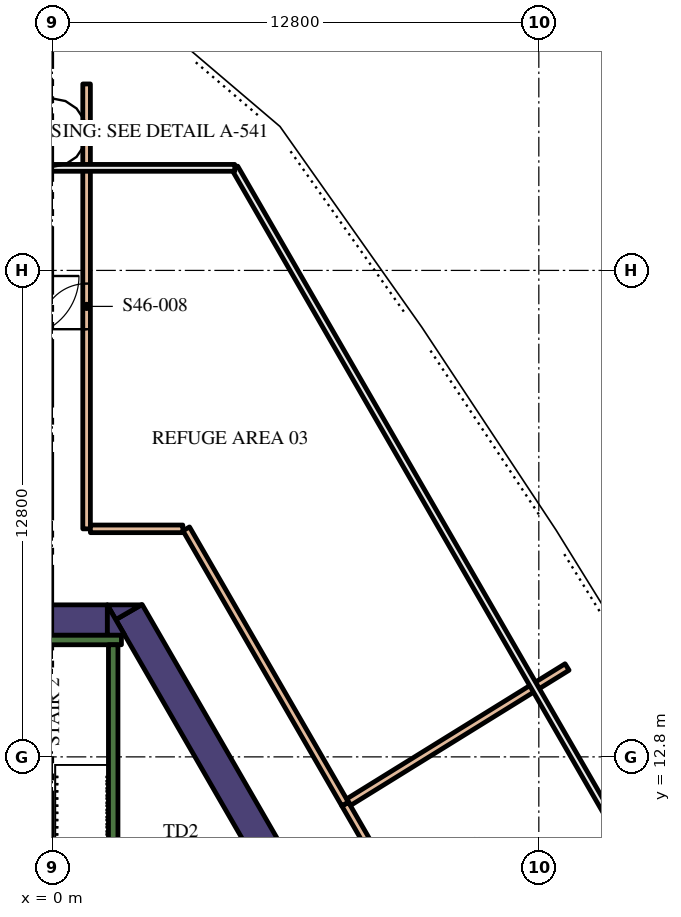
"""IFC4 building model, lengths in metres.
Left out: names, types, materials, properties, quantities, classifications, styles, units other than length and angle.
Written with IfcOpenShell. Run it as: python <this file> out.ifc"""

import sys

from ifc_helpers import new_model, si_unit, direction, frame, frame_2d, origin, place, context, subcontext, project, spatial, polyline, rectangle, outline, extrude, element, fill, save


model = new_model("IFC4")
c1 = context("Model", 3, precision=1e-05, world=origin(), true_north=direction((0.0, 1.0)))
c2 = subcontext(c1, "Body", "Model", "MODEL_VIEW")
j1 = project(units=[si_unit("LENGTHUNIT", "METRE"), si_unit("PLANEANGLEUNIT", "RADIAN")], contexts=[c1])
p1 = place(None, origin())
s1 = spatial("IfcSite", under=j1, at=p1, CompositionType="ELEMENT")
p2 = place(p1, origin())
s2 = spatial("IfcBuilding", under=s1, at=p2, CompositionType="ELEMENT")
p3 = place(p2, frame((0.0, 0.0, 196.2)))
s3 = spatial("IfcBuildingStorey", under=s2, at=p3, CompositionType="ELEMENT", Elevation=196.2)
p4 = place(p3, frame((8.279, 5.761, 0.0), z_axis=(0.0, 0.0, 1.0), x_axis=(-0.500010359015, 0.866019422922, 0.0)))
e1 = element("IfcWall", 1, at=p4, inside=s3, PredefinedType="SOLIDWALL", context=c2, shape_type="SweptSolid", body=[
    extrude(rectangle(XDim=12.528, YDim=0.8, at=frame_2d((6.264, 0.0))), origin(), (0.0, 0.0, 1.0), 5.4),
])
p5 = place(p3, origin())
e2 = element("IfcWall", 2, at=p5, inside=s3, PredefinedType="SOLIDWALL", context=c2, shape_type="SweptSolid", body=[
    extrude(outline(polyline([(1.443, 16.8), (2.339, 16.8), (1.667, 16.412), (1.443, 16.8)])), origin(), (0.0, 0.0, 1.0), 5.4),
])
p6 = place(p3, frame((-2.379, 16.4, 0.0), z_axis=(0.0, 0.0, 1.0), x_axis=(1.0, 0.0, 0.0)))
e3 = element("IfcWall", 3, at=p6, inside=s3, PredefinedType="SOLIDWALL", context=c2, shape_type="SweptSolid", body=[
    extrude(rectangle(XDim=3.824, YDim=0.8, at=frame_2d((1.912, 0.0))), origin(), (0.0, 0.0, 1.0), 5.4),
])
e4 = element("IfcWall", 4, at=p5, inside=s3, PredefinedType="SOLIDWALL", context=c2, shape_type="SweptSolid", body=[
    extrude(outline(polyline([(1.905, 16.0), (1.447, 16.0), (1.447, 16.793), (1.905, 16.0)])), origin(), (0.0, 0.0, 1.0), 5.4),
])
p7 = place(p3, frame((-1.817, 15.875, 0.0), z_axis=(0.0, 0.0, 1.0), x_axis=(1.0, 0.0, 0.0)))
e5 = element("IfcWall", 5, at=p7, inside=s3, PredefinedType="SOLIDWALL", context=c2, shape_type="SweptSolid", body=[
    extrude(rectangle(XDim=3.634, YDim=0.25, at=frame_2d((1.817, 0.0))), origin(), (0.0, 0.0, 1.0), 5.4),
])
p8 = place(p3, frame((1.6, 8.95, 0.0), z_axis=(0.0, 0.0, 1.0), x_axis=(0.0, 1.0, 0.0)))
e6 = element("IfcWall", 6, at=p8, inside=s3, PredefinedType="SOLIDWALL", context=c2, shape_type="SweptSolid", body=[
    extrude(rectangle(XDim=6.8, YDim=0.25, at=frame_2d((3.4, 0.0))), origin(), (0.0, 0.0, 1.0), 5.4),
])
p9 = place(p3, frame((13.858, 0.897, 0.0), z_axis=(0.0, 0.0, 1.0), x_axis=(-0.500005845305, 0.86602202897, 0.0)))
e7 = element("IfcWall", 7, at=p9, inside=s3, PredefinedType="PARTITIONING", context=c2, shape_type="SweptSolid", body=[
    extrude(rectangle(XDim=12.304, YDim=0.2, at=frame_2d((6.152, 0.0))), origin(), (0.0, 0.0, 1.0), 4.65),
])
p10 = place(p9, frame((5.352, 0.0, 0.0)))
e8 = element("IfcOpeningElement", 8, at=p10, cuts=e7, PredefinedType="OPENING", context=c2, shape_type="SweptSolid", body=[
    extrude(rectangle(XDim=1.6, YDim=2.1, at=frame_2d((0.8, 1.05))), frame((0.0, 0.11, 0.0), z_axis=(0.0, -1.0, 0.0), x_axis=(1.0, 0.0, 0.0)), (0.0, 0.0, 1.0), 0.22),
])
p11 = place(p3, frame((0.9, 18.8, 0.0), z_axis=(0.0, 0.0, 1.0), x_axis=(0.0, 1.0, 0.0)))
e9 = element("IfcWall", 9, at=p11, inside=s3, PredefinedType="PARTITIONING", context=c2, shape_type="SweptSolid", body=[
    extrude(rectangle(XDim=11.706, YDim=0.2, at=frame_2d((5.853, 0.0))), origin(), (0.0, 0.0, 1.0), 4.65),
])
p12 = place(p11, frame((5.253, 0.0, 0.0)))
e10 = element("IfcOpeningElement", 10, at=p12, cuts=e9, PredefinedType="OPENING", context=c2, shape_type="SweptSolid", body=[
    extrude(rectangle(XDim=1.2, YDim=2.1, at=frame_2d((0.6, 1.05))), frame((0.0, 0.11, 0.0), z_axis=(0.0, -1.0, 0.0), x_axis=(1.0, 0.0, 0.0)), (0.0, 0.0, 1.0), 0.22),
])
p13 = place(p3, frame((3.522, 18.8, 0.0), z_axis=(0.0, 0.0, 1.0), x_axis=(0.500012366307, -0.866018263976, 0.0)))
e11 = element("IfcWall", 11, at=p13, inside=s3, PredefinedType="PARTITIONING", context=c2, shape_type="SweptSolid", body=[
    extrude(rectangle(XDim=8.359, YDim=0.2, at=frame_2d((4.179, 0.0))), origin(), (0.0, 0.0, 1.0), 4.65),
])
p14 = place(p3, frame((7.8, 11.611, 0.0), z_axis=(0.0, 0.0, 1.0), x_axis=(0.850373744728, 0.526179146562, 0.0)))
e12 = element("IfcWall", 12, at=p14, inside=s3, PredefinedType="PARTITIONING", context=c2, shape_type="SweptSolid", body=[
    extrude(rectangle(XDim=6.754, YDim=0.2, at=frame_2d((3.377, 0.0))), origin(), (0.0, 0.0, 1.0), 4.65),
])
p15 = place(p3, frame((1.0, 18.8, 0.0), z_axis=(0.0, 0.0, 1.0), x_axis=(1.0, 0.0, 0.0)))
e13 = element("IfcWall", 13, at=p15, inside=s3, PredefinedType="PARTITIONING", context=c2, shape_type="SweptSolid", body=[
    extrude(rectangle(XDim=2.432, YDim=0.2, at=frame_2d((1.216, 0.0))), origin(), (0.0, 0.0, 1.0), 4.65),
])
p16 = place(p12, origin())
e14 = element("IfcDoor", 14, at=p16, inside=s3, OperationType="SINGLE_SWING_RIGHT", PredefinedType="DOOR", context=c2, shape_type="SweptSolid", body=[
    extrude(rectangle(XDim=1.2, YDim=2.1, at=frame_2d((0.6, 1.05))), frame((0.0, 0.025, 0.0), z_axis=(0.0, -1.0, 0.0), x_axis=(1.0, 0.0, 0.0)), (0.0, 0.0, 1.0), 0.05),
])
fill(e10, e14)
save(model, sys.argv[1])
